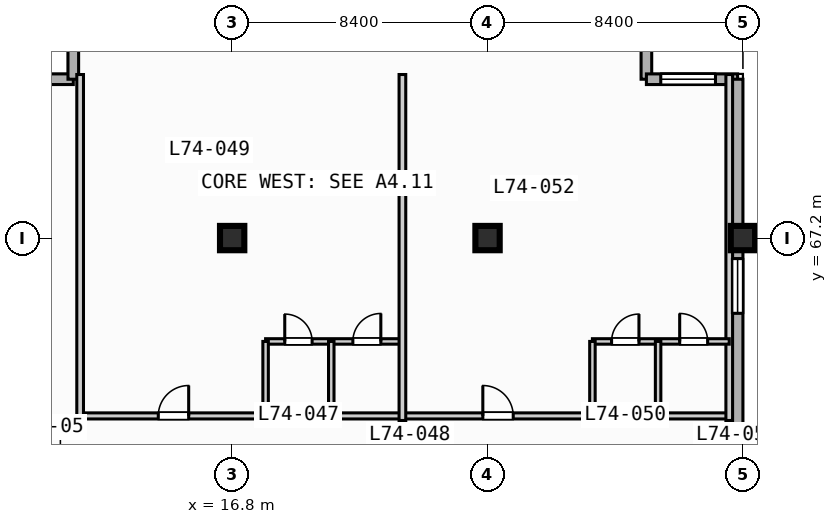
"""IFC4 building model, lengths in metres.
Left out: names, types, materials, properties, quantities, classifications, styles, units other than length and angle.
Written with IfcOpenShell. Run it as: python <this file> out.ifc"""

import sys

from ifc_helpers import new_model, si_unit, direction, frame, frame_2d, origin, origin_2d, place, context, subcontext, project, spatial, rectangle, extrude, element, fill, save


model = new_model("IFC4")
c1 = context("Model", 3, precision=1e-05, world=origin(), true_north=direction((0.0, 1.0)))
c2 = subcontext(c1, "Body", "Model", "MODEL_VIEW")
j1 = project(units=[si_unit("LENGTHUNIT", "METRE"), si_unit("PLANEANGLEUNIT", "RADIAN")], contexts=[c1])
p1 = place(None, origin())
s1 = spatial("IfcSite", under=j1, at=p1, CompositionType="ELEMENT")
p2 = place(p1, origin())
s2 = spatial("IfcBuilding", under=s1, at=p2, CompositionType="ELEMENT")
p3 = place(p2, frame((0.0, 0.0, 300.8)))
s3 = spatial("IfcBuildingStorey", under=s2, at=p3, CompositionType="ELEMENT", Elevation=300.8)
for number, where, z_axis, x_axis in (
    (1, (16.8, 67.2, 0.0), (0.0, 0.0, 1.0), (1.0, 0.0, 0.0)),
    (2, (25.2, 67.2, 0.0), (0.0, 0.0, 1.0), (1.0, 0.0, 0.0)),
    (3, (33.6, 67.2, 0.0), (0.0, 0.0, 1.0), (1.0, 0.0, 0.0)),
):
    element("IfcColumn", number, at=place(p3, frame(where, z_axis=z_axis, x_axis=x_axis)), inside=s3, PredefinedType="COLUMN", context=c2, shape_type="SweptSolid", body=[
        extrude(rectangle(XDim=0.8, YDim=0.8, at=origin_2d()), origin(), (0.0, 0.0, 1.0), 3.9),
    ])
for number, where, z_axis, x_axis in (
    (4, (8.575, 72.425, 0.0), (0.0, 0.0, 1.0), (1.0, 0.0, 0.0)),
    (5, (11.575, 72.425, 0.0), (0.0, 0.0, 1.0), (0.0, 1.0, 0.0)),
    (6, (30.425, 75.425, 0.0), (0.0, 0.0, 1.0), (0.0, -1.0, 0.0)),
):
    element("IfcWall", number, at=place(p3, frame(where, z_axis=z_axis, x_axis=x_axis)), inside=s3, PredefinedType="STANDARD", context=c2, shape_type="SweptSolid", body=[
        extrude(rectangle(XDim=3.0, YDim=0.35, at=frame_2d((1.5, 0.0))), origin(), (0.0, 0.0, 1.0), 3.67),
    ])
p4 = place(p3, frame((30.425, 72.425, 0.0), z_axis=(0.0, 0.0, 1.0), x_axis=(1.0, 0.0, 0.0)))
e7 = element("IfcWall", 7, at=p4, inside=s3, PredefinedType="STANDARD", context=c2, shape_type="SweptSolid", body=[
    extrude(rectangle(XDim=3.0, YDim=0.35, at=frame_2d((1.5, 0.0))), origin(), (0.0, 0.0, 1.0), 3.67),
])
p5 = place(p4, frame((0.472, 0.0, 0.85)))
e8 = element("IfcOpeningElement", 8, at=p5, cuts=e7, PredefinedType="OPENING", context=c2, shape_type="SweptSolid", body=[
    extrude(rectangle(XDim=1.8, YDim=1.8, at=frame_2d((0.9, 0.9))), frame((0.0, 0.185, 0.0), z_axis=(0.0, -1.0, 0.0), x_axis=(1.0, 0.0, 0.0)), (0.0, 0.0, 1.0), 0.37),
])
p6 = place(p3, frame((33.425, 72.425, 0.0), z_axis=(0.0, 0.0, 1.0), x_axis=(0.0, -1.0, 0.0)))
e9 = element("IfcWall", 9, at=p6, inside=s3, PredefinedType="STANDARD", context=c2, shape_type="SweptSolid", body=[
    extrude(rectangle(XDim=39.0, YDim=0.35, at=frame_2d((19.5, 0.0))), origin(), (0.0, 0.0, 1.0), 3.67),
])
p7 = place(p6, frame((5.9, 0.0, 0.85)))
e10 = element("IfcOpeningElement", 10, at=p7, cuts=e9, PredefinedType="OPENING", context=c2, shape_type="SweptSolid", body=[
    extrude(rectangle(XDim=1.8, YDim=1.8, at=frame_2d((0.9, 0.9))), frame((0.0, 0.185, 0.0), z_axis=(0.0, -1.0, 0.0), x_axis=(1.0, 0.0, 0.0)), (0.0, 0.0, 1.0), 0.37),
])
p8 = place(p3, frame((11.8, 61.35, 0.0), z_axis=(0.0, 0.0, 1.0), x_axis=(1.0, 0.0, 0.0)))
e11 = element("IfcWall", 11, at=p8, inside=s3, PredefinedType="PARTITIONING", context=c2, shape_type="SweptSolid", body=[
    extrude(rectangle(XDim=21.35, YDim=0.2, at=frame_2d((10.675, 0.0))), origin(), (0.0, 0.0, 1.0), 3.67),
])
p9 = place(p8, frame((2.57, 0.0, 0.0)))
e12 = element("IfcOpeningElement", 12, at=p9, cuts=e11, PredefinedType="OPENING", context=c2, shape_type="SweptSolid", body=[
    extrude(rectangle(XDim=1.0, YDim=2.15, at=frame_2d((0.5, 1.075))), frame((0.0, 0.11, 0.0), z_axis=(0.0, -1.0, 0.0), x_axis=(1.0, 0.0, 0.0)), (0.0, 0.0, 1.0), 0.22),
])
p10 = place(p8, frame((13.245, 0.0, 0.0)))
e13 = element("IfcOpeningElement", 13, at=p10, cuts=e11, PredefinedType="OPENING", context=c2, shape_type="SweptSolid", body=[
    extrude(rectangle(XDim=1.0, YDim=2.15, at=frame_2d((0.5, 1.075))), frame((0.0, 0.11, 0.0), z_axis=(0.0, -1.0, 0.0), x_axis=(1.0, 0.0, 0.0)), (0.0, 0.0, 1.0), 0.22),
])
p11 = place(p3, frame((11.8, 61.2, 0.0), z_axis=(0.0, 0.0, 1.0), x_axis=(0.0, 1.0, 0.0)))
e14 = element("IfcWall", 14, at=p11, inside=s3, PredefinedType="PARTITIONING", context=c2, shape_type="SweptSolid", body=[
    extrude(rectangle(XDim=11.38, YDim=0.22, at=frame_2d((5.69, 0.0))), origin(), (0.0, 0.0, 1.0), 3.67),
])
p12 = place(p3, frame((17.9, 63.8, 0.0), z_axis=(0.0, 0.0, 1.0), x_axis=(1.0, 0.0, 0.0)))
e15 = element("IfcWall", 15, at=p12, inside=s3, PredefinedType="PLUMBINGWALL", context=c2, shape_type="SweptSolid", body=[
    extrude(rectangle(XDim=4.5, YDim=0.18, at=frame_2d((2.25, 0.0))), origin(), (0.0, 0.0, 1.0), 3.67),
])
p13 = place(p12, frame((0.63, 0.0, 0.0)))
e16 = element("IfcOpeningElement", 16, at=p13, cuts=e15, PredefinedType="OPENING", context=c2, shape_type="SweptSolid", body=[
    extrude(rectangle(XDim=0.9, YDim=2.1, at=frame_2d((0.45, 1.05))), frame((0.0, 0.1, 0.0), z_axis=(0.0, -1.0, 0.0), x_axis=(1.0, 0.0, 0.0)), (0.0, 0.0, 1.0), 0.2),
])
p14 = place(p12, frame((2.87, 0.0, 0.0)))
e17 = element("IfcOpeningElement", 17, at=p14, cuts=e15, PredefinedType="OPENING", context=c2, shape_type="SweptSolid", body=[
    extrude(rectangle(XDim=0.92, YDim=2.1, at=frame_2d((0.46, 1.05))), frame((0.0, 0.1, 0.0), z_axis=(0.0, -1.0, 0.0), x_axis=(1.0, 0.0, 0.0)), (0.0, 0.0, 1.0), 0.2),
])
for number, where, z_axis, x_axis in (
    (18, (17.9, 61.35, 0.0), (0.0, 0.0, 1.0), (0.0, 1.0, 0.0)),
    (19, (20.06, 61.35, 0.0), (0.0, 0.0, 1.0), (0.0, 1.0, 0.0)),
):
    element("IfcWall", number, at=place(p3, frame(where, z_axis=z_axis, x_axis=x_axis)), inside=s3, PredefinedType="PLUMBINGWALL", context=c2, shape_type="SweptSolid", body=[
        extrude(rectangle(XDim=2.45, YDim=0.18, at=frame_2d((1.225, 0.0))), origin(), (0.0, 0.0, 1.0), 3.67),
    ])
for number, where, z_axis, x_axis in (
    (20, (22.4, 61.2, 0.0), (0.0, 0.0, 1.0), (0.0, 1.0, 0.0)),
    (21, (33.15, 61.2, 0.0), (0.0, 0.0, 1.0), (0.0, 1.0, 0.0)),
):
    element("IfcWall", number, at=place(p3, frame(where, z_axis=z_axis, x_axis=x_axis)), inside=s3, PredefinedType="PARTITIONING", context=c2, shape_type="SweptSolid", body=[
        extrude(rectangle(XDim=11.38, YDim=0.22, at=frame_2d((5.69, 0.0))), origin(), (0.0, 0.0, 1.0), 3.67),
    ])
p15 = place(p3, frame((28.65, 63.8, 0.0), z_axis=(0.0, 0.0, 1.0), x_axis=(1.0, 0.0, 0.0)))
e22 = element("IfcWall", 22, at=p15, inside=s3, PredefinedType="PLUMBINGWALL", context=c2, shape_type="SweptSolid", body=[
    extrude(rectangle(XDim=4.5, YDim=0.18, at=frame_2d((2.25, 0.0))), origin(), (0.0, 0.0, 1.0), 3.67),
])
p16 = place(p15, frame((0.63, 0.0, 0.0)))
e23 = element("IfcOpeningElement", 23, at=p16, cuts=e22, PredefinedType="OPENING", context=c2, shape_type="SweptSolid", body=[
    extrude(rectangle(XDim=0.9, YDim=2.1, at=frame_2d((0.45, 1.05))), frame((0.0, 0.1, 0.0), z_axis=(0.0, -1.0, 0.0), x_axis=(1.0, 0.0, 0.0)), (0.0, 0.0, 1.0), 0.2),
])
p17 = place(p15, frame((2.87, 0.0, 0.0)))
e24 = element("IfcOpeningElement", 24, at=p17, cuts=e22, PredefinedType="OPENING", context=c2, shape_type="SweptSolid", body=[
    extrude(rectangle(XDim=0.92, YDim=2.1, at=frame_2d((0.46, 1.05))), frame((0.0, 0.1, 0.0), z_axis=(0.0, -1.0, 0.0), x_axis=(1.0, 0.0, 0.0)), (0.0, 0.0, 1.0), 0.2),
])
for number, where, z_axis, x_axis in (
    (25, (28.65, 61.35, 0.0), (0.0, 0.0, 1.0), (0.0, 1.0, 0.0)),
    (26, (30.81, 61.35, 0.0), (0.0, 0.0, 1.0), (0.0, 1.0, 0.0)),
):
    element("IfcWall", number, at=place(p3, frame(where, z_axis=z_axis, x_axis=x_axis)), inside=s3, PredefinedType="PLUMBINGWALL", context=c2, shape_type="SweptSolid", body=[
        extrude(rectangle(XDim=2.45, YDim=0.18, at=frame_2d((1.225, 0.0))), origin(), (0.0, 0.0, 1.0), 3.67),
    ])
p18 = place(p5, origin())
e27 = element("IfcWindow", 27, at=p18, inside=s3, PartitioningType="SINGLE_PANEL", PredefinedType="WINDOW", context=c2, shape_type="SweptSolid", body=[
    extrude(rectangle(XDim=1.8, YDim=1.8, at=frame_2d((0.9, 0.9))), frame((0.0, 0.03, 0.0), z_axis=(0.0, -1.0, 0.0), x_axis=(1.0, 0.0, 0.0)), (0.0, 0.0, 1.0), 0.06),
])
fill(e8, e27)
p19 = place(p7, origin())
e28 = element("IfcWindow", 28, at=p19, inside=s3, PartitioningType="SINGLE_PANEL", PredefinedType="WINDOW", context=c2, shape_type="SweptSolid", body=[
    extrude(rectangle(XDim=1.8, YDim=1.8, at=frame_2d((0.9, 0.9))), frame((0.0, 0.03, 0.0), z_axis=(0.0, -1.0, 0.0), x_axis=(1.0, 0.0, 0.0)), (0.0, 0.0, 1.0), 0.06),
])
fill(e10, e28)
p20 = place(p9, origin())
e29 = element("IfcDoor", 29, at=p20, inside=s3, OperationType="SINGLE_SWING_RIGHT", PredefinedType="DOOR", context=c2, shape_type="SweptSolid", body=[
    extrude(rectangle(XDim=1.0, YDim=2.15, at=frame_2d((0.5, 1.075))), frame((0.0, 0.025, 0.0), z_axis=(0.0, -1.0, 0.0), x_axis=(1.0, 0.0, 0.0)), (0.0, 0.0, 1.0), 0.05),
])
fill(e12, e29)
p21 = place(p10, origin())
e30 = element("IfcDoor", 30, at=p21, inside=s3, OperationType="SINGLE_SWING_LEFT", PredefinedType="DOOR", context=c2, shape_type="SweptSolid", body=[
    extrude(rectangle(XDim=1.0, YDim=2.15, at=frame_2d((0.5, 1.075))), frame((0.0, 0.025, 0.0), z_axis=(0.0, -1.0, 0.0), x_axis=(1.0, 0.0, 0.0)), (0.0, 0.0, 1.0), 0.05),
])
fill(e13, e30)
p22 = place(p13, origin())
e31 = element("IfcDoor", 31, at=p22, inside=s3, OperationType="SINGLE_SWING_LEFT", PredefinedType="DOOR", context=c2, shape_type="SweptSolid", body=[
    extrude(rectangle(XDim=0.9, YDim=2.1, at=frame_2d((0.45, 1.05))), frame((0.0, 0.025, 0.0), z_axis=(0.0, -1.0, 0.0), x_axis=(1.0, 0.0, 0.0)), (0.0, 0.0, 1.0), 0.05),
])
fill(e16, e31)
p23 = place(p14, origin())
e32 = element("IfcDoor", 32, at=p23, inside=s3, OperationType="SINGLE_SWING_RIGHT", PredefinedType="DOOR", context=c2, shape_type="SweptSolid", body=[
    extrude(rectangle(XDim=0.92, YDim=2.1, at=frame_2d((0.46, 1.05))), frame((0.0, 0.025, 0.0), z_axis=(0.0, -1.0, 0.0), x_axis=(1.0, 0.0, 0.0)), (0.0, 0.0, 1.0), 0.05),
])
fill(e17, e32)
p24 = place(p16, origin())
e33 = element("IfcDoor", 33, at=p24, inside=s3, OperationType="SINGLE_SWING_RIGHT", PredefinedType="DOOR", context=c2, shape_type="SweptSolid", body=[
    extrude(rectangle(XDim=0.9, YDim=2.1, at=frame_2d((0.45, 1.05))), frame((0.0, 0.025, 0.0), z_axis=(0.0, -1.0, 0.0), x_axis=(1.0, 0.0, 0.0)), (0.0, 0.0, 1.0), 0.05),
])
fill(e23, e33)
p25 = place(p17, origin())
e34 = element("IfcDoor", 34, at=p25, inside=s3, OperationType="SINGLE_SWING_LEFT", PredefinedType="DOOR", context=c2, shape_type="SweptSolid", body=[
    extrude(rectangle(XDim=0.92, YDim=2.1, at=frame_2d((0.46, 1.05))), frame((0.0, 0.025, 0.0), z_axis=(0.0, -1.0, 0.0), x_axis=(1.0, 0.0, 0.0)), (0.0, 0.0, 1.0), 0.05),
])
fill(e24, e34)
save(model, sys.argv[1])
